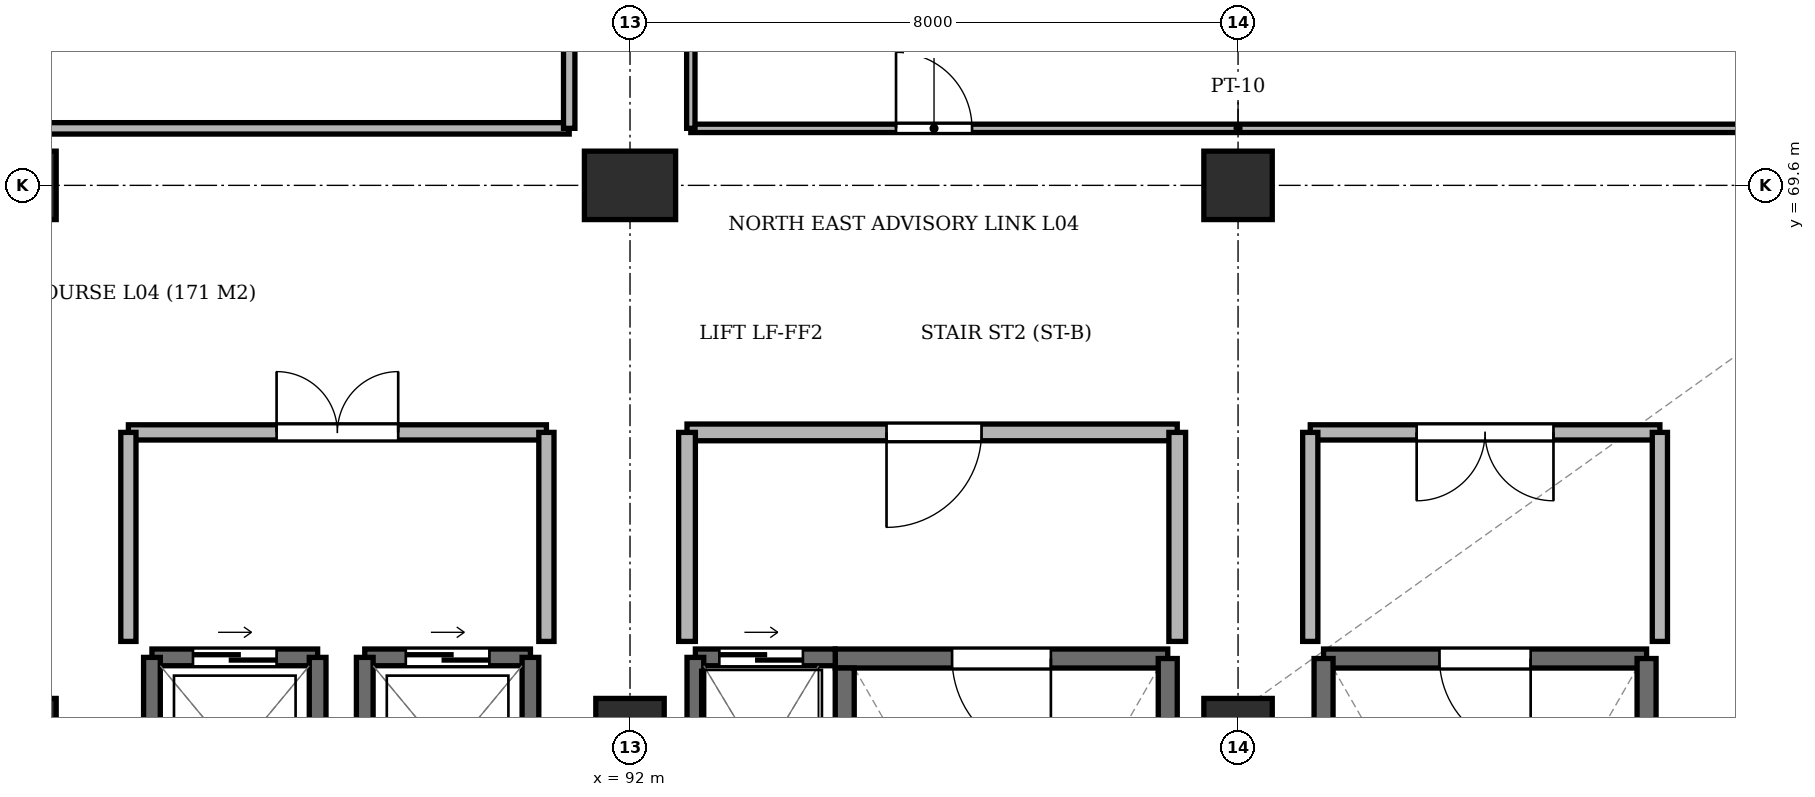
"""IFC4 building model, lengths in metres.
Left out: names, types, materials, properties, quantities, classifications, styles, units other than length and angle.
Written with IfcOpenShell. Run it as: python <this file> out.ifc"""

import sys

from ifc_helpers import new_model, si_unit, direction, frame, frame_2d, origin, origin_2d, place, context, subcontext, project, spatial, rectangle, extrude, element, fill, save


model = new_model("IFC4")
c1 = context("Model", 3, precision=1e-05, world=origin(), true_north=direction((0.0, 1.0)))
c2 = subcontext(c1, "Body", "Model", "MODEL_VIEW")
j1 = project(units=[si_unit("LENGTHUNIT", "METRE"), si_unit("PLANEANGLEUNIT", "RADIAN")], contexts=[c1])
p1 = place(None, origin())
s1 = spatial("IfcSite", under=j1, at=p1, CompositionType="ELEMENT")
p2 = place(p1, origin())
s2 = spatial("IfcBuilding", under=s1, at=p2, CompositionType="ELEMENT")
p3 = place(p2, frame((0.0, 0.0, 24.15)))
s3 = spatial("IfcBuildingStorey", under=s2, at=p3, CompositionType="ELEMENT", Elevation=24.15)
for number, where, z_axis, x_axis in (
    (1, (84.0, 62.4, -0.5), (0.0, 0.0, 1.0), (1.0, 0.0, 0.0)),
    (2, (84.0, 69.6, -0.5), (0.0, 0.0, 1.0), (1.0, 0.0, 0.0)),
    (3, (92.0, 62.4, -0.5), (0.0, 0.0, 1.0), (1.0, 0.0, 0.0)),
):
    element("IfcColumn", number, at=place(p3, frame(where, z_axis=z_axis, x_axis=x_axis)), inside=s3, PredefinedType="COLUMN", context=c2, shape_type="SweptSolid", body=[
        extrude(rectangle(XDim=0.9, YDim=0.9, at=origin_2d()), origin(), (0.0, 0.0, 1.0), 3.64),
    ])
p4 = place(p3, frame((92.0, 69.6, -0.5), z_axis=(0.0, 0.0, 1.0), x_axis=(1.0, 0.0, 0.0)))
e4 = element("IfcColumn", 4, at=p4, inside=s3, PredefinedType="COLUMN", context=c2, shape_type="SweptSolid", body=[
    extrude(rectangle(XDim=1.2, YDim=0.9, at=origin_2d()), origin(), (0.0, 0.0, 1.0), 3.64),
])
for number, where, z_axis, x_axis in (
    (5, (100.0, 62.4, -0.5), (0.0, 0.0, 1.0), (1.0, 0.0, 0.0)),
    (6, (100.0, 69.6, -0.5), (0.0, 0.0, 1.0), (1.0, 0.0, 0.0)),
):
    element("IfcColumn", number, at=place(p3, frame(where, z_axis=z_axis, x_axis=x_axis)), inside=s3, PredefinedType="COLUMN", context=c2, shape_type="SweptSolid", body=[
        extrude(rectangle(XDim=0.9, YDim=0.9, at=origin_2d()), origin(), (0.0, 0.0, 1.0), 3.64),
    ])
p5 = place(p3, frame((99.075, 63.375, 0.0), z_axis=(0.0, 0.0, 1.0), x_axis=(-1.0, 0.0, 0.0)))
e7 = element("IfcWall", 7, at=p5, inside=s3, PredefinedType="SHEAR", context=c2, shape_type="SweptSolid", body=[
    extrude(rectangle(XDim=4.375, YDim=0.25, at=frame_2d((2.188, 0.0))), origin(), (0.0, 0.0, 1.0), 3.14),
])
p6 = place(p5, frame((1.538, 0.0, 0.0)))
e8 = element("IfcOpeningElement", 8, at=p6, cuts=e7, PredefinedType="OPENING", context=c2, shape_type="SweptSolid", body=[
    extrude(rectangle(XDim=1.3, YDim=2.2, at=frame_2d((0.65, 1.1))), frame((0.0, 0.137, 0.0), z_axis=(0.0, -1.0, 0.0), x_axis=(1.0, 0.0, 0.0)), (0.0, 0.0, 1.0), 0.274),
])
p7 = place(p3, frame((94.825, 63.25, 0.0), z_axis=(0.0, 0.0, 1.0), x_axis=(0.0, -1.0, 0.0)))
e9 = element("IfcWall", 9, at=p7, inside=s3, PredefinedType="SHEAR", context=c2, shape_type="SweptSolid", body=[
    extrude(rectangle(XDim=7.075, YDim=0.25, at=frame_2d((3.538, 0.0))), origin(), (0.0, 0.0, 1.0), 3.14),
])
p8 = place(p3, frame((99.075, 56.175, 0.0), z_axis=(0.0, 0.0, 1.0), x_axis=(0.0, 1.0, 0.0)))
e10 = element("IfcWall", 10, at=p8, inside=s3, PredefinedType="SHEAR", context=c2, shape_type="SweptSolid", body=[
    extrude(rectangle(XDim=7.2, YDim=0.25, at=frame_2d((3.6, 0.0))), origin(), (0.0, 0.0, 1.0), 3.14),
])
p9 = place(p3, frame((105.375, 63.375, 0.0), z_axis=(0.0, 0.0, 1.0), x_axis=(-1.0, 0.0, 0.0)))
e11 = element("IfcWall", 11, at=p9, inside=s3, PredefinedType="SHEAR", context=c2, shape_type="SweptSolid", body=[
    extrude(rectangle(XDim=4.25, YDim=0.25, at=frame_2d((2.125, 0.0))), origin(), (0.0, 0.0, 1.0), 3.14),
])
p10 = place(p9, frame((1.525, 0.0, 0.0)))
e12 = element("IfcOpeningElement", 12, at=p10, cuts=e11, PredefinedType="OPENING", context=c2, shape_type="SweptSolid", body=[
    extrude(rectangle(XDim=1.2, YDim=2.2, at=frame_2d((0.6, 1.1))), frame((0.0, 0.137, 0.0), z_axis=(0.0, -1.0, 0.0), x_axis=(1.0, 0.0, 0.0)), (0.0, 0.0, 1.0), 0.274),
])
for number, where, z_axis, x_axis in (
    (13, (101.125, 63.375, 0.0), (0.0, 0.0, 1.0), (0.0, -1.0, 0.0)),
    (14, (105.375, 56.175, 0.0), (0.0, 0.0, 1.0), (0.0, 1.0, 0.0)),
):
    element("IfcWall", number, at=place(p3, frame(where, z_axis=z_axis, x_axis=x_axis)), inside=s3, PredefinedType="SHEAR", context=c2, shape_type="SweptSolid", body=[
        extrude(rectangle(XDim=7.2, YDim=0.25, at=frame_2d((3.6, 0.0))), origin(), (0.0, 0.0, 1.0), 3.14),
    ])
p11 = place(p3, frame((94.7, 63.39, 0.0), z_axis=(0.0, 0.0, 1.0), x_axis=(-1.0, 0.0, 0.0)))
e15 = element("IfcWall", 15, at=p11, inside=s3, PredefinedType="SHEAR", context=c2, shape_type="SweptSolid", body=[
    extrude(rectangle(XDim=1.84, YDim=0.22, at=frame_2d((0.92, 0.0))), origin(), (0.0, 0.0, 1.0), 3.14),
])
p12 = place(p11, frame((0.425, 0.0, 0.0)))
e16 = element("IfcOpeningElement", 16, at=p12, cuts=e15, PredefinedType="OPENING", context=c2, shape_type="SweptSolid", body=[
    extrude(rectangle(XDim=1.1, YDim=2.2, at=frame_2d((0.55, 1.1))), frame((0.0, 0.122, 0.0), z_axis=(0.0, -1.0, 0.0), x_axis=(1.0, 0.0, 0.0)), (0.0, 0.0, 1.0), 0.244),
])
p13 = place(p3, frame((92.86, 63.39, 0.0), z_axis=(0.0, 0.0, 1.0), x_axis=(0.0, -1.0, 0.0)))
e17 = element("IfcWall", 17, at=p13, inside=s3, PredefinedType="SHEAR", context=c2, shape_type="SweptSolid", body=[
    extrude(rectangle(XDim=2.73, YDim=0.22, at=frame_2d((1.365, 0.0))), origin(), (0.0, 0.0, 1.0), 3.14),
])
p14 = place(p3, frame((87.89, 63.39, 0.0), z_axis=(0.0, 0.0, 1.0), x_axis=(-1.0, 0.0, 0.0)))
e18 = element("IfcWall", 18, at=p14, inside=s3, PredefinedType="SHEAR", context=c2, shape_type="SweptSolid", body=[
    extrude(rectangle(XDim=2.18, YDim=0.22, at=frame_2d((1.09, 0.0))), origin(), (0.0, 0.0, 1.0), 3.14),
])
p15 = place(p14, frame((0.54, 0.0, 0.0)))
e19 = element("IfcOpeningElement", 19, at=p15, cuts=e18, PredefinedType="OPENING", context=c2, shape_type="SweptSolid", body=[
    extrude(rectangle(XDim=1.1, YDim=2.2, at=frame_2d((0.55, 1.1))), frame((0.0, 0.122, 0.0), z_axis=(0.0, -1.0, 0.0), x_axis=(1.0, 0.0, 0.0)), (0.0, 0.0, 1.0), 0.244),
])
for number, where, z_axis, x_axis in (
    (20, (85.71, 63.39, 0.0), (0.0, 0.0, 1.0), (0.0, -1.0, 0.0)),
    (21, (87.89, 60.81, 0.0), (0.0, 0.0, 1.0), (0.0, 1.0, 0.0)),
):
    element("IfcWall", number, at=place(p3, frame(where, z_axis=z_axis, x_axis=x_axis)), inside=s3, PredefinedType="SHEAR", context=c2, shape_type="SweptSolid", body=[
        extrude(rectangle(XDim=2.58, YDim=0.22, at=frame_2d((1.29, 0.0))), origin(), (0.0, 0.0, 1.0), 3.14),
    ])
p16 = place(p3, frame((90.69, 63.39, 0.0), z_axis=(0.0, 0.0, 1.0), x_axis=(-1.0, 0.0, 0.0)))
e22 = element("IfcWall", 22, at=p16, inside=s3, PredefinedType="SHEAR", context=c2, shape_type="SweptSolid", body=[
    extrude(rectangle(XDim=2.18, YDim=0.22, at=frame_2d((1.09, 0.0))), origin(), (0.0, 0.0, 1.0), 3.14),
])
p17 = place(p16, frame((0.54, 0.0, 0.0)))
e23 = element("IfcOpeningElement", 23, at=p17, cuts=e22, PredefinedType="OPENING", context=c2, shape_type="SweptSolid", body=[
    extrude(rectangle(XDim=1.1, YDim=2.2, at=frame_2d((0.55, 1.1))), frame((0.0, 0.122, 0.0), z_axis=(0.0, -1.0, 0.0), x_axis=(1.0, 0.0, 0.0)), (0.0, 0.0, 1.0), 0.244),
])
for number, where, z_axis, x_axis in (
    (24, (88.51, 63.39, 0.0), (0.0, 0.0, 1.0), (0.0, -1.0, 0.0)),
    (25, (90.69, 60.81, 0.0), (0.0, 0.0, 1.0), (0.0, 1.0, 0.0)),
):
    element("IfcWall", number, at=place(p3, frame(where, z_axis=z_axis, x_axis=x_axis)), inside=s3, PredefinedType="SHEAR", context=c2, shape_type="SweptSolid", body=[
        extrude(rectangle(XDim=2.58, YDim=0.22, at=frame_2d((1.29, 0.0))), origin(), (0.0, 0.0, 1.0), 3.14),
    ])
p18 = place(p3, frame((100.95, 66.35, 0.0), z_axis=(0.0, 0.0, 1.0), x_axis=(1.0, 0.0, 0.0)))
e26 = element("IfcWall", 26, at=p18, inside=s3, PredefinedType="PARTITIONING", context=c2, shape_type="SweptSolid", body=[
    extrude(rectangle(XDim=4.6, YDim=0.2, at=frame_2d((2.3, 0.0))), origin(), (0.0, 0.0, 1.0), 2.68),
])
p19 = place(p18, frame((1.4, 0.0, 0.0)))
e27 = element("IfcOpeningElement", 27, at=p19, cuts=e26, PredefinedType="OPENING", context=c2, shape_type="SweptSolid", body=[
    extrude(rectangle(XDim=1.8, YDim=2.2, at=frame_2d((0.9, 1.1))), frame((0.0, 0.112, 0.0), z_axis=(0.0, -1.0, 0.0), x_axis=(1.0, 0.0, 0.0)), (0.0, 0.0, 1.0), 0.224),
])
for number, where, z_axis, x_axis in (
    (28, (100.95, 63.6, 0.0), (0.0, 0.0, 1.0), (0.0, 1.0, 0.0)),
    (29, (105.55, 63.6, 0.0), (0.0, 0.0, 1.0), (0.0, 1.0, 0.0)),
):
    element("IfcWall", number, at=place(p3, frame(where, z_axis=z_axis, x_axis=x_axis)), inside=s3, PredefinedType="PARTITIONING", context=c2, shape_type="SweptSolid", body=[
        extrude(rectangle(XDim=2.75, YDim=0.2, at=frame_2d((1.375, 0.0))), origin(), (0.0, 0.0, 1.0), 2.68),
    ])
p20 = place(p3, frame((92.75, 66.35, 0.0), z_axis=(0.0, 0.0, 1.0), x_axis=(1.0, 0.0, 0.0)))
e30 = element("IfcWall", 30, at=p20, inside=s3, PredefinedType="PARTITIONING", context=c2, shape_type="SweptSolid", body=[
    extrude(rectangle(XDim=6.45, YDim=0.22, at=frame_2d((3.225, 0.0))), origin(), (0.0, 0.0, 1.0), 2.68),
])
p21 = place(p20, frame((2.625, 0.0, 0.0)))
e31 = element("IfcOpeningElement", 31, at=p21, cuts=e30, PredefinedType="OPENING", context=c2, shape_type="SweptSolid", body=[
    extrude(rectangle(XDim=1.25, YDim=2.2, at=frame_2d((0.625, 1.1))), frame((0.0, 0.122, 0.0), z_axis=(0.0, -1.0, 0.0), x_axis=(1.0, 0.0, 0.0)), (0.0, 0.0, 1.0), 0.244),
])
for number, where, z_axis, x_axis in (
    (32, (92.75, 63.6, 0.0), (0.0, 0.0, 1.0), (0.0, 1.0, 0.0)),
    (33, (99.2, 63.6, 0.0), (0.0, 0.0, 1.0), (0.0, 1.0, 0.0)),
):
    element("IfcWall", number, at=place(p3, frame(where, z_axis=z_axis, x_axis=x_axis)), inside=s3, PredefinedType="PARTITIONING", context=c2, shape_type="SweptSolid", body=[
        extrude(rectangle(XDim=2.75, YDim=0.22, at=frame_2d((1.375, 0.0))), origin(), (0.0, 0.0, 1.0), 2.68),
    ])
p22 = place(p3, frame((85.4, 66.35, 0.0), z_axis=(0.0, 0.0, 1.0), x_axis=(1.0, 0.0, 0.0)))
e34 = element("IfcWall", 34, at=p22, inside=s3, PredefinedType="PARTITIONING", context=c2, shape_type="SweptSolid", body=[
    extrude(rectangle(XDim=5.5, YDim=0.2, at=frame_2d((2.75, 0.0))), origin(), (0.0, 0.0, 1.0), 2.68),
])
p23 = place(p22, frame((1.95, 0.0, 0.0)))
e35 = element("IfcOpeningElement", 35, at=p23, cuts=e34, PredefinedType="OPENING", context=c2, shape_type="SweptSolid", body=[
    extrude(rectangle(XDim=1.6, YDim=2.2, at=frame_2d((0.8, 1.1))), frame((0.0, 0.112, 0.0), z_axis=(0.0, -1.0, 0.0), x_axis=(1.0, 0.0, 0.0)), (0.0, 0.0, 1.0), 0.224),
])
for number, where, z_axis, x_axis in (
    (36, (85.4, 63.6, 0.0), (0.0, 0.0, 1.0), (0.0, 1.0, 0.0)),
    (37, (90.9, 63.6, 0.0), (0.0, 0.0, 1.0), (0.0, 1.0, 0.0)),
):
    element("IfcWall", number, at=place(p3, frame(where, z_axis=z_axis, x_axis=x_axis)), inside=s3, PredefinedType="PARTITIONING", context=c2, shape_type="SweptSolid", body=[
        extrude(rectangle(XDim=2.75, YDim=0.2, at=frame_2d((1.375, 0.0))), origin(), (0.0, 0.0, 1.0), 2.68),
    ])
p24 = place(p3, frame((75.0, 70.35, 0.0), z_axis=(0.0, 0.0, 1.0), x_axis=(1.0, 0.0, 0.0)))
e38 = element("IfcWall", 38, at=p24, inside=s3, PredefinedType="PARTITIONING", context=c2, shape_type="SweptSolid", body=[
    extrude(rectangle(XDim=16.2, YDim=0.15, at=frame_2d((8.1, 0.0))), origin(), (0.0, 0.0, 1.0), 2.68),
])
p25 = place(p3, frame((91.2, 70.35, 0.0), z_axis=(0.0, 0.0, 1.0), x_axis=(0.0, 1.0, 0.0)))
e39 = element("IfcWall", 39, at=p25, inside=s3, PredefinedType="PARTITIONING", context=c2, shape_type="SweptSolid", body=[
    extrude(rectangle(XDim=5.65, YDim=0.15, at=frame_2d((2.825, 0.0))), origin(), (0.0, 0.0, 1.0), 2.68),
])
p26 = place(p3, frame((92.8, 70.35, 0.0), z_axis=(0.0, 0.0, 1.0), x_axis=(1.0, 0.0, 0.0)))
e40 = element("IfcWall", 40, at=p26, inside=s3, PredefinedType="PARTITIONING", context=c2, shape_type="SweptSolid", body=[
    extrude(rectangle(XDim=14.4, YDim=0.11, at=frame_2d((7.2, 0.0))), origin(), (0.0, 0.0, 1.0), 2.68),
])
p27 = place(p26, frame((2.7, 0.0, 0.0)))
e41 = element("IfcOpeningElement", 41, at=p27, cuts=e40, PredefinedType="OPENING", context=c2, shape_type="SweptSolid", body=[
    extrude(rectangle(XDim=1.0, YDim=2.15, at=frame_2d((0.5, 1.075))), frame((0.0, 0.067, 0.0), z_axis=(0.0, -1.0, 0.0), x_axis=(1.0, 0.0, 0.0)), (0.0, 0.0, 1.0), 0.134),
])
p28 = place(p3, frame((92.8, 70.35, 0.0), z_axis=(0.0, 0.0, 1.0), x_axis=(0.0, 1.0, 0.0)))
e42 = element("IfcWall", 42, at=p28, inside=s3, PredefinedType="PARTITIONING", context=c2, shape_type="SweptSolid", body=[
    extrude(rectangle(XDim=5.65, YDim=0.11, at=frame_2d((2.825, 0.0))), origin(), (0.0, 0.0, 1.0), 2.68),
])
p29 = place(p6, origin())
e43 = element("IfcDoor", 43, at=p29, inside=s3, OperationType="SINGLE_SWING_LEFT", PredefinedType="DOOR", context=c2, shape_type="SweptSolid", body=[
    extrude(rectangle(XDim=1.3, YDim=2.2, at=frame_2d((0.65, 1.1))), frame((0.0, 0.025, 0.0), z_axis=(0.0, -1.0, 0.0), x_axis=(1.0, 0.0, 0.0)), (0.0, 0.0, 1.0), 0.05),
])
fill(e8, e43)
p30 = place(p10, origin())
e44 = element("IfcDoor", 44, at=p30, inside=s3, OperationType="SINGLE_SWING_LEFT", PredefinedType="DOOR", context=c2, shape_type="SweptSolid", body=[
    extrude(rectangle(XDim=1.2, YDim=2.2, at=frame_2d((0.6, 1.1))), frame((0.0, 0.025, 0.0), z_axis=(0.0, -1.0, 0.0), x_axis=(1.0, 0.0, 0.0)), (0.0, 0.0, 1.0), 0.05),
])
fill(e12, e44)
p31 = place(p12, origin())
e45 = element("IfcDoor", 45, at=p31, inside=s3, OperationType="SLIDING_TO_LEFT", PredefinedType="DOOR", context=c2, shape_type="SweptSolid", body=[
    extrude(rectangle(XDim=1.1, YDim=2.2, at=frame_2d((0.55, 1.1))), frame((0.0, 0.025, 0.0), z_axis=(0.0, -1.0, 0.0), x_axis=(1.0, 0.0, 0.0)), (0.0, 0.0, 1.0), 0.05),
])
fill(e16, e45)
p32 = place(p15, origin())
e46 = element("IfcDoor", 46, at=p32, inside=s3, OperationType="SLIDING_TO_LEFT", PredefinedType="DOOR", context=c2, shape_type="SweptSolid", body=[
    extrude(rectangle(XDim=1.1, YDim=2.2, at=frame_2d((0.55, 1.1))), frame((0.0, 0.025, 0.0), z_axis=(0.0, -1.0, 0.0), x_axis=(1.0, 0.0, 0.0)), (0.0, 0.0, 1.0), 0.05),
])
fill(e19, e46)
p33 = place(p17, origin())
e47 = element("IfcDoor", 47, at=p33, inside=s3, OperationType="SLIDING_TO_LEFT", PredefinedType="DOOR", context=c2, shape_type="SweptSolid", body=[
    extrude(rectangle(XDim=1.1, YDim=2.2, at=frame_2d((0.55, 1.1))), frame((0.0, 0.025, 0.0), z_axis=(0.0, -1.0, 0.0), x_axis=(1.0, 0.0, 0.0)), (0.0, 0.0, 1.0), 0.05),
])
fill(e23, e47)
p34 = place(p19, frame((1.8, 0.0, 0.0), z_axis=(0.0, 0.0, 1.0), x_axis=(-1.0, 0.0, 0.0)))
e48 = element("IfcDoor", 48, at=p34, inside=s3, OperationType="DOUBLE_DOOR_SINGLE_SWING", PredefinedType="DOOR", context=c2, shape_type="SweptSolid", body=[
    extrude(rectangle(XDim=1.8, YDim=2.2, at=frame_2d((0.9, 1.1))), frame((0.0, 0.025, 0.0), z_axis=(0.0, -1.0, 0.0), x_axis=(1.0, 0.0, 0.0)), (0.0, 0.0, 1.0), 0.05),
])
fill(e27, e48)
p35 = place(p21, frame((1.25, 0.0, 0.0), z_axis=(0.0, 0.0, 1.0), x_axis=(-1.0, 0.0, 0.0)))
e49 = element("IfcDoor", 49, at=p35, inside=s3, OperationType="SINGLE_SWING_LEFT", PredefinedType="DOOR", context=c2, shape_type="SweptSolid", body=[
    extrude(rectangle(XDim=1.25, YDim=2.2, at=frame_2d((0.625, 1.1))), frame((0.0, 0.025, 0.0), z_axis=(0.0, -1.0, 0.0), x_axis=(1.0, 0.0, 0.0)), (0.0, 0.0, 1.0), 0.05),
])
fill(e31, e49)
p36 = place(p23, origin())
e50 = element("IfcDoor", 50, at=p36, inside=s3, OperationType="DOUBLE_DOOR_SINGLE_SWING", PredefinedType="DOOR", context=c2, shape_type="SweptSolid", body=[
    extrude(rectangle(XDim=1.6, YDim=2.2, at=frame_2d((0.8, 1.1))), frame((0.0, 0.025, 0.0), z_axis=(0.0, -1.0, 0.0), x_axis=(1.0, 0.0, 0.0)), (0.0, 0.0, 1.0), 0.05),
])
fill(e35, e50)
p37 = place(p27, origin())
e51 = element("IfcDoor", 51, at=p37, inside=s3, OperationType="SINGLE_SWING_LEFT", PredefinedType="DOOR", context=c2, shape_type="SweptSolid", body=[
    extrude(rectangle(XDim=1.0, YDim=2.15, at=frame_2d((0.5, 1.075))), frame((0.0, 0.025, 0.0), z_axis=(0.0, -1.0, 0.0), x_axis=(1.0, 0.0, 0.0)), (0.0, 0.0, 1.0), 0.05),
])
fill(e41, e51)
save(model, sys.argv[1])
